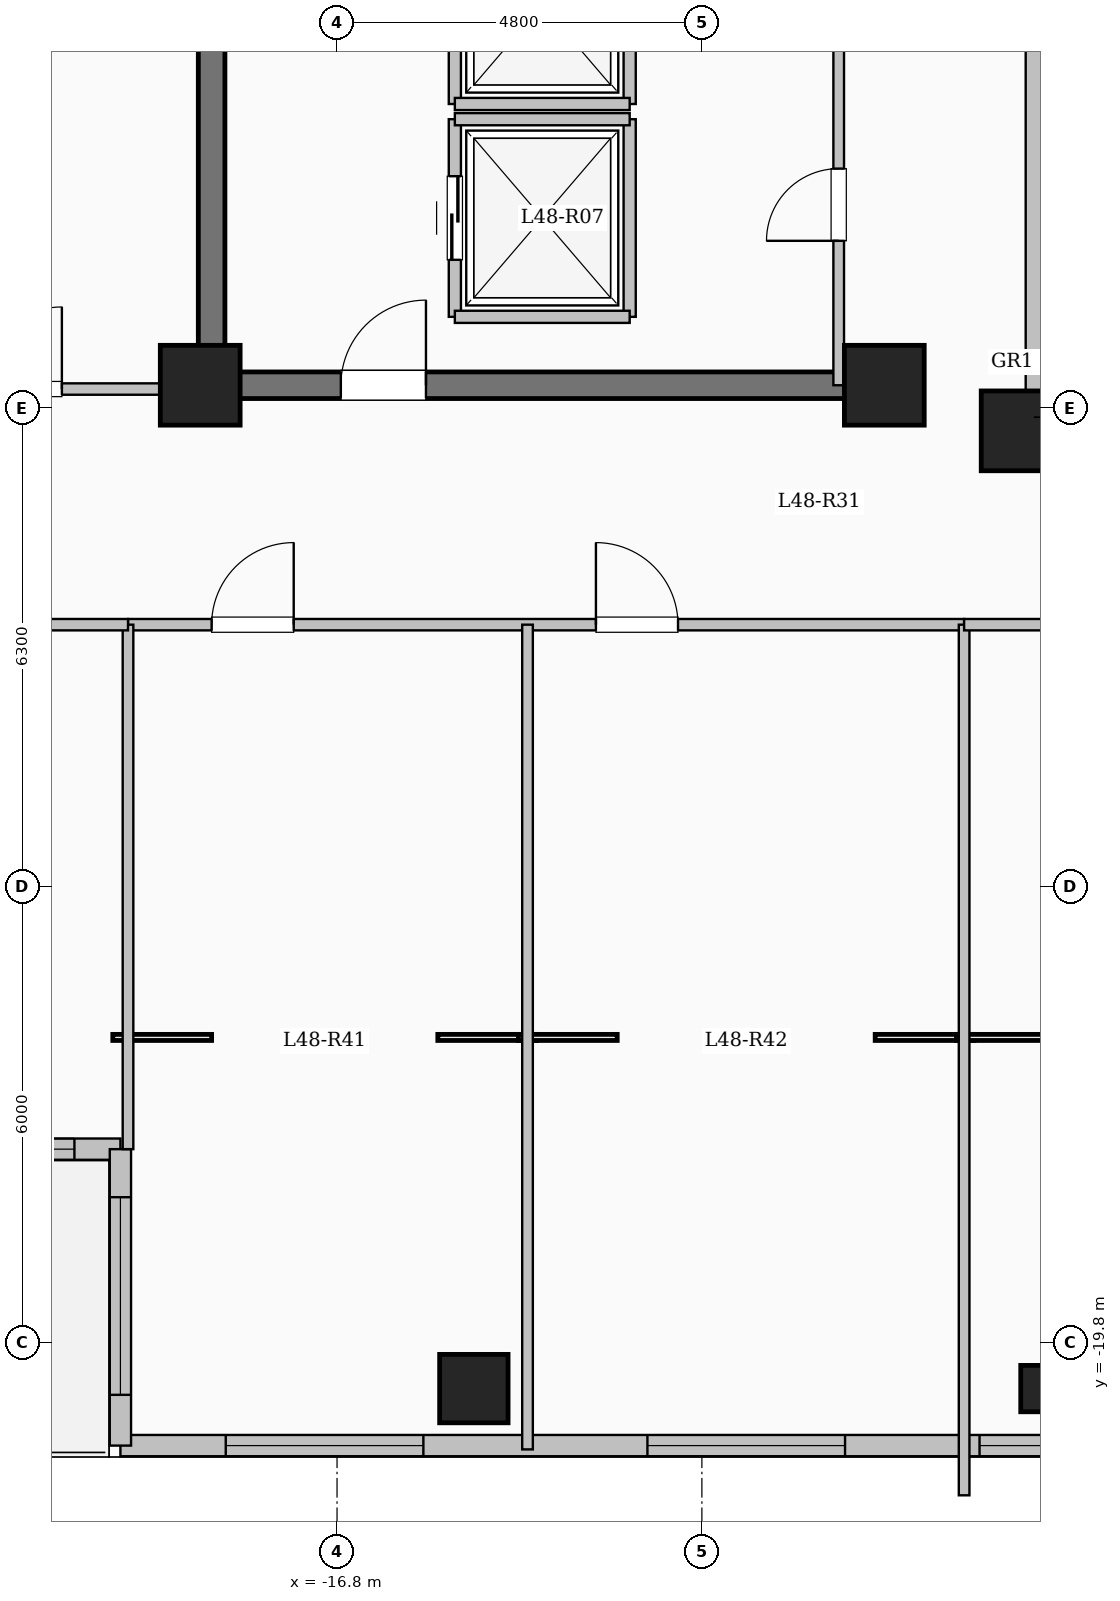
"""IFC4 building model, lengths in metres.
Left out: names, types, materials, properties, quantities, classifications, styles, units other than length and angle.
Written with IfcOpenShell. Run it as: python <this file> out.ifc"""

import sys

from ifc_helpers import new_model, si_unit, direction, frame, frame_2d, origin, origin_2d, place, context, subcontext, project, spatial, rectangle, hollow_circle, extrude, element, fill, save


model = new_model("IFC4")
c1 = context("Model", 3, precision=1e-05, world=origin(), true_north=direction((0.0, 1.0)))
c2 = subcontext(c1, "Body", "Model", "MODEL_VIEW")
j1 = project(units=[si_unit("LENGTHUNIT", "METRE"), si_unit("PLANEANGLEUNIT", "RADIAN")], contexts=[c1])
p1 = place(None, origin())
s1 = spatial("IfcSite", under=j1, at=p1, CompositionType="ELEMENT")
p2 = place(p1, origin())
s2 = spatial("IfcBuilding", under=s1, at=p2, CompositionType="ELEMENT")
p3 = place(p2, frame((0.0, 0.0, 177.3)))
s3 = spatial("IfcBuildingStorey", under=s2, at=p3, CompositionType="ELEMENT", Elevation=177.3)
for number, where, z_axis, x_axis in (
    (1, (-7.8, -7.8, 0.0), (0.0, 0.0, 1.0), (1.0, 0.0, 0.0)),
    (2, (-9.6, -7.2, 0.0), (0.0, 0.0, 1.0), (1.0, 0.0, 0.0)),
    (3, (-18.6, -7.2, 0.0), (0.0, 0.0, 1.0), (1.0, 0.0, 0.0)),
):
    element("IfcColumn", number, at=place(p3, frame(where, z_axis=z_axis, x_axis=x_axis)), inside=s3, PredefinedType="COLUMN", context=c2, shape_type="SweptSolid", body=[
        extrude(rectangle(XDim=1.05, YDim=1.05, at=origin_2d()), origin(), (0.0, 0.0, 1.0), 4.5),
    ])
p4 = place(p3, frame((-15.0, -20.4, 0.0), z_axis=(0.0, 0.0, 1.0), x_axis=(1.0, 0.0, 0.0)))
e4 = element("IfcColumn", 4, at=p4, inside=s3, PredefinedType="COLUMN", context=c2, shape_type="SweptSolid", body=[
    extrude(rectangle(XDim=0.9, YDim=0.9, at=origin_2d()), origin(), (0.0, 0.0, 1.0), 4.5),
])
p5 = place(p3, frame((-7.5, -20.4, 0.0), z_axis=(0.0, 0.0, 1.0), x_axis=(1.0, 0.0, 0.0)))
e5 = element("IfcColumn", 5, at=p5, inside=s3, PredefinedType="COLUMN", context=c2, shape_type="SweptSolid", body=[
    extrude(hollow_circle(Radius=0.305, WallThickness=0.025, at=origin_2d()), origin(), (0.0, 0.0, 1.0), 4.5),
])
p6 = place(p3, frame((-7.62, 7.62, 0.0), z_axis=(0.0, 0.0, 1.0), x_axis=(0.0, -1.0, 0.0)))
e6 = element("IfcWall", 6, at=p6, inside=s3, PredefinedType="SOLIDWALL", context=c2, shape_type="SweptSolid", body=[
    extrude(rectangle(XDim=15.24, YDim=0.24, at=frame_2d((7.62, 0.0))), origin(), (0.0, 0.0, 1.0), 4.2),
])
p7 = place(p6, frame((6.92, 0.0, 0.95)))
e7 = element("IfcOpeningElement", 7, at=p7, cuts=e6, PredefinedType="OPENING", context=c2, shape_type="SweptSolid", body=[
    extrude(rectangle(XDim=1.4, YDim=1.5, at=frame_2d((0.7, 0.75))), frame((0.0, 0.13, 0.0), z_axis=(0.0, -1.0, 0.0), x_axis=(1.0, 0.0, 0.0)), (0.0, 0.0, 1.0), 0.26),
])
p8 = place(p3, frame((-19.65, -17.25, 0.0), z_axis=(0.0, 0.0, 1.0), x_axis=(-1.0, 0.0, 0.0)))
e8 = element("IfcWall", 8, at=p8, inside=s3, PredefinedType="SOLIDWALL", context=c2, shape_type="SweptSolid", body=[
    extrude(rectangle(XDim=5.4, YDim=0.28, at=frame_2d((2.7, 0.0))), origin(), (0.0, 0.0, 1.0), 4.2),
])
p9 = place(p8, frame((2.25, 0.0, 0.0)))
e9 = element("IfcOpeningElement", 9, at=p9, cuts=e8, PredefinedType="OPENING", context=c2, shape_type="SweptSolid", body=[
    extrude(rectangle(XDim=1.1, YDim=2.2, at=frame_2d((0.55, 1.1))), frame((0.0, 0.15, 0.0), z_axis=(0.0, -1.0, 0.0), x_axis=(1.0, 0.0, 0.0)), (0.0, 0.0, 1.0), 0.3),
])
p10 = place(p8, frame((0.605, 0.0, 0.95)))
e10 = element("IfcOpeningElement", 10, at=p10, cuts=e8, PredefinedType="OPENING", context=c2, shape_type="SweptSolid", body=[
    extrude(rectangle(XDim=1.2, YDim=1.5, at=frame_2d((0.6, 0.75))), frame((0.0, 0.15, 0.0), z_axis=(0.0, -1.0, 0.0), x_axis=(1.0, 0.0, 0.0)), (0.0, 0.0, 1.0), 0.3),
])
p11 = place(p3, frame((-7.35, -21.15, 0.0), z_axis=(0.0, 0.0, 1.0), x_axis=(-1.0, 0.0, 0.0)))
e11 = element("IfcWall", 11, at=p11, inside=s3, PredefinedType="SOLIDWALL", context=c2, shape_type="SweptSolid", body=[
    extrude(rectangle(XDim=12.3, YDim=0.28, at=frame_2d((6.15, 0.0))), origin(), (0.0, 0.0, 1.0), 4.2),
])
p12 = place(p11, frame((0.147, 0.0, 0.95)))
e12 = element("IfcOpeningElement", 12, at=p12, cuts=e11, PredefinedType="OPENING", context=c2, shape_type="SweptSolid", body=[
    extrude(rectangle(XDim=0.85, YDim=1.5, at=frame_2d((0.425, 0.75))), frame((0.0, 0.15, 0.0), z_axis=(0.0, -1.0, 0.0), x_axis=(1.0, 0.0, 0.0)), (0.0, 0.0, 1.0), 0.3),
])
p13 = place(p11, frame((2.767, 0.0, 0.85)))
e13 = element("IfcOpeningElement", 13, at=p13, cuts=e11, PredefinedType="OPENING", context=c2, shape_type="SweptSolid", body=[
    extrude(rectangle(XDim=2.6, YDim=2.4, at=frame_2d((1.3, 1.2))), frame((0.0, 0.15, 0.0), z_axis=(0.0, -1.0, 0.0), x_axis=(1.0, 0.0, 0.0)), (0.0, 0.0, 1.0), 0.3),
])
p14 = place(p11, frame((8.314, 0.0, 0.85)))
e14 = element("IfcOpeningElement", 14, at=p14, cuts=e11, PredefinedType="OPENING", context=c2, shape_type="SweptSolid", body=[
    extrude(rectangle(XDim=2.6, YDim=2.4, at=frame_2d((1.3, 1.2))), frame((0.0, 0.15, 0.0), z_axis=(0.0, -1.0, 0.0), x_axis=(1.0, 0.0, 0.0)), (0.0, 0.0, 1.0), 0.3),
])
p15 = place(p3, frame((-19.65, -21.15, 0.0), z_axis=(0.0, 0.0, 1.0), x_axis=(0.0, 1.0, 0.0)))
e15 = element("IfcWall", 15, at=p15, inside=s3, PredefinedType="SOLIDWALL", context=c2, shape_type="SweptSolid", body=[
    extrude(rectangle(XDim=3.9, YDim=0.28, at=frame_2d((1.95, 0.0))), origin(), (0.0, 0.0, 1.0), 4.2),
])
p16 = place(p15, frame((0.668, 0.0, 0.85)))
e16 = element("IfcOpeningElement", 16, at=p16, cuts=e15, PredefinedType="OPENING", context=c2, shape_type="SweptSolid", body=[
    extrude(rectangle(XDim=2.6, YDim=2.4, at=frame_2d((1.3, 1.2))), frame((0.0, 0.15, 0.0), z_axis=(0.0, -1.0, 0.0), x_axis=(1.0, 0.0, 0.0)), (0.0, 0.0, 1.0), 0.3),
])
p17 = place(p3, frame((-15.25, -6.3, 0.0), z_axis=(0.0, 0.0, 1.0), x_axis=(0.0, 1.0, 0.0)))
e17 = element("IfcWall", 17, at=p17, inside=s3, PredefinedType="SOLIDWALL", context=c2, shape_type="SweptSolid", body=[
    extrude(rectangle(XDim=2.6, YDim=0.16, at=frame_2d((1.3, 0.0))), origin(), (0.0, 0.0, 1.0), 4.2),
])
p18 = place(p17, frame((0.75, 0.0, 0.0)))
e18 = element("IfcOpeningElement", 18, at=p18, cuts=e17, PredefinedType="OPENING", context=c2, shape_type="SweptSolid", body=[
    extrude(rectangle(XDim=1.1, YDim=2.15, at=frame_2d((0.55, 1.075))), frame((0.0, 0.09, 0.0), z_axis=(0.0, -1.0, 0.0), x_axis=(1.0, 0.0, 0.0)), (0.0, 0.0, 1.0), 0.18),
])
p19 = place(p3, frame((-12.95, -6.3, 0.0), z_axis=(0.0, 0.0, 1.0), x_axis=(0.0, 1.0, 0.0)))
e19 = element("IfcWall", 19, at=p19, inside=s3, PredefinedType="SOLIDWALL", context=c2, shape_type="SweptSolid", body=[
    extrude(rectangle(XDim=2.6, YDim=0.16, at=frame_2d((1.3, 0.0))), origin(), (0.0, 0.0, 1.0), 4.2),
])
for number, where, z_axis, x_axis in (
    (20, (-15.25, -6.3, 0.0), (0.0, 0.0, 1.0), (1.0, 0.0, 0.0)),
    (21, (-15.25, -3.7, 0.0), (0.0, 0.0, 1.0), (1.0, 0.0, 0.0)),
):
    element("IfcWall", number, at=place(p3, frame(where, z_axis=z_axis, x_axis=x_axis)), inside=s3, PredefinedType="SOLIDWALL", context=c2, shape_type="SweptSolid", body=[
        extrude(rectangle(XDim=2.3, YDim=0.16, at=frame_2d((1.15, 0.0))), origin(), (0.0, 0.0, 1.0), 4.2),
    ])
p20 = place(p3, frame((-15.25, -3.5, 0.0), z_axis=(0.0, 0.0, 1.0), x_axis=(0.0, 1.0, 0.0)))
e22 = element("IfcWall", 22, at=p20, inside=s3, PredefinedType="SOLIDWALL", context=c2, shape_type="SweptSolid", body=[
    extrude(rectangle(XDim=2.6, YDim=0.16, at=frame_2d((1.3, 0.0))), origin(), (0.0, 0.0, 1.0), 4.2),
])
p21 = place(p20, frame((0.75, 0.0, 0.0)))
e23 = element("IfcOpeningElement", 23, at=p21, cuts=e22, PredefinedType="OPENING", context=c2, shape_type="SweptSolid", body=[
    extrude(rectangle(XDim=1.1, YDim=2.15, at=frame_2d((0.55, 1.075))), frame((0.0, 0.09, 0.0), z_axis=(0.0, -1.0, 0.0), x_axis=(1.0, 0.0, 0.0)), (0.0, 0.0, 1.0), 0.18),
])
p22 = place(p3, frame((-12.95, -3.5, 0.0), z_axis=(0.0, 0.0, 1.0), x_axis=(0.0, 1.0, 0.0)))
e24 = element("IfcWall", 24, at=p22, inside=s3, PredefinedType="SOLIDWALL", context=c2, shape_type="SweptSolid", body=[
    extrude(rectangle(XDim=2.6, YDim=0.16, at=frame_2d((1.3, 0.0))), origin(), (0.0, 0.0, 1.0), 4.2),
])
p23 = place(p3, frame((-15.25, -3.5, 0.0), z_axis=(0.0, 0.0, 1.0), x_axis=(1.0, 0.0, 0.0)))
e25 = element("IfcWall", 25, at=p23, inside=s3, PredefinedType="SOLIDWALL", context=c2, shape_type="SweptSolid", body=[
    extrude(rectangle(XDim=2.3, YDim=0.16, at=frame_2d((1.15, 0.0))), origin(), (0.0, 0.0, 1.0), 4.2),
])
p24 = place(p3, frame((-18.45, -7.375, 0.0), z_axis=(0.0, 0.0, 1.0), x_axis=(0.0, 1.0, 0.0)))
e26 = element("IfcWall", 26, at=p24, inside=s3, PredefinedType="SHEAR", context=c2, shape_type="SweptSolid", body=[
    extrude(rectangle(XDim=14.05, YDim=0.35, at=frame_2d((7.025, 0.0))), origin(), (0.0, 0.0, 1.0), 4.5),
])
p25 = place(p3, frame((-18.625, -7.2, 0.0), z_axis=(0.0, 0.0, 1.0), x_axis=(1.0, 0.0, 0.0)))
e27 = element("IfcWall", 27, at=p25, inside=s3, PredefinedType="SHEAR", context=c2, shape_type="SweptSolid", body=[
    extrude(rectangle(XDim=8.55, YDim=0.35, at=frame_2d((4.275, 0.0))), origin(), (0.0, 0.0, 1.0), 4.5),
])
p26 = place(p25, frame((1.875, 0.0, 0.0)))
e28 = element("IfcOpeningElement", 28, at=p26, cuts=e27, PredefinedType="OPENING", context=c2, shape_type="SweptSolid", body=[
    extrude(rectangle(XDim=1.12, YDim=2.15, at=frame_2d((0.56, 1.075))), frame((0.0, 0.185, 0.0), z_axis=(0.0, -1.0, 0.0), x_axis=(1.0, 0.0, 0.0)), (0.0, 0.0, 1.0), 0.37),
])
p27 = place(p3, frame((-10.2, -7.2, 0.0), z_axis=(0.0, 0.0, 1.0), x_axis=(0.0, 1.0, 0.0)))
e29 = element("IfcWall", 29, at=p27, inside=s3, PredefinedType="PARTITIONING", context=c2, shape_type="SweptSolid", body=[
    extrude(rectangle(XDim=9.12, YDim=0.14, at=frame_2d((4.56, 0.0))), origin(), (0.0, 0.0, 1.0), 4.2),
])
p28 = place(p27, frame((1.9, 0.0, 0.0)))
e30 = element("IfcOpeningElement", 30, at=p28, cuts=e29, PredefinedType="OPENING", context=c2, shape_type="SweptSolid", body=[
    extrude(rectangle(XDim=0.95, YDim=2.12, at=frame_2d((0.475, 1.06))), frame((0.0, 0.08, 0.0), z_axis=(0.0, -1.0, 0.0), x_axis=(1.0, 0.0, 0.0)), (0.0, 0.0, 1.0), 0.16),
])
p29 = place(p27, frame((7.9, 0.0, 0.0)))
e31 = element("IfcOpeningElement", 31, at=p29, cuts=e29, PredefinedType="OPENING", context=c2, shape_type="SweptSolid", body=[
    extrude(rectangle(XDim=0.95, YDim=2.12, at=frame_2d((0.475, 1.06))), frame((0.0, 0.08, 0.0), z_axis=(0.0, -1.0, 0.0), x_axis=(1.0, 0.0, 0.0)), (0.0, 0.0, 1.0), 0.16),
])
p30 = place(p3, frame((-19.55, -10.35, 0.0), z_axis=(0.0, 0.0, 1.0), x_axis=(1.0, 0.0, 0.0)))
e32 = element("IfcWall", 32, at=p30, inside=s3, PredefinedType="PARTITIONING", context=c2, shape_type="SweptSolid", body=[
    extrude(rectangle(XDim=11.0, YDim=0.15, at=frame_2d((5.5, 0.0))), origin(), (0.0, 0.0, 1.0), 4.2),
])
p31 = place(p30, frame((1.1, 0.0, 0.0)))
e33 = element("IfcOpeningElement", 33, at=p31, cuts=e32, PredefinedType="OPENING", context=c2, shape_type="SweptSolid", body=[
    extrude(rectangle(XDim=1.08, YDim=2.15, at=frame_2d((0.54, 1.075))), frame((0.0, 0.085, 0.0), z_axis=(0.0, -1.0, 0.0), x_axis=(1.0, 0.0, 0.0)), (0.0, 0.0, 1.0), 0.17),
])
p32 = place(p30, frame((6.156, 0.0, 0.0)))
e34 = element("IfcOpeningElement", 34, at=p32, cuts=e32, PredefinedType="OPENING", context=c2, shape_type="SweptSolid", body=[
    extrude(rectangle(XDim=1.08, YDim=2.15, at=frame_2d((0.54, 1.075))), frame((0.0, 0.085, 0.0), z_axis=(0.0, -1.0, 0.0), x_axis=(1.0, 0.0, 0.0)), (0.0, 0.0, 1.0), 0.17),
])
p33 = place(p3, frame((-14.294, -21.2, 0.0), z_axis=(0.0, 0.0, 1.0), x_axis=(0.0, 1.0, 0.0)))
e35 = element("IfcWall", 35, at=p33, inside=s3, PredefinedType="PARTITIONING", context=c2, shape_type="SweptSolid", body=[
    extrude(rectangle(XDim=10.85, YDim=0.14, at=frame_2d((5.425, 0.0))), origin(), (0.0, 0.0, 1.0), 4.2),
])
p34 = place(p3, frame((-8.55, -21.804, 0.0), z_axis=(0.0, 0.0, 1.0), x_axis=(0.0, 1.0, 0.0)))
e36 = element("IfcWall", 36, at=p34, inside=s3, PredefinedType="PARTITIONING", context=c2, shape_type="SweptSolid", body=[
    extrude(rectangle(XDim=11.454, YDim=0.14, at=frame_2d((5.727, 0.0))), origin(), (0.0, 0.0, 1.0), 4.2),
])
p35 = place(p3, frame((-8.55, -10.35, 0.0), z_axis=(0.0, 0.0, 1.0), x_axis=(1.0, 0.0, 0.0)))
e37 = element("IfcWall", 37, at=p35, inside=s3, PredefinedType="PARTITIONING", context=c2, shape_type="SweptSolid", body=[
    extrude(rectangle(XDim=17.1, YDim=0.15, at=frame_2d((8.55, 0.0))), origin(), (0.0, 0.0, 1.0), 4.2),
])
p36 = place(p35, frame((1.4, 0.0, 0.0)))
e38 = element("IfcOpeningElement", 38, at=p36, cuts=e37, PredefinedType="OPENING", context=c2, shape_type="SweptSolid", body=[
    extrude(rectangle(XDim=1.08, YDim=2.15, at=frame_2d((0.54, 1.075))), frame((0.0, 0.085, 0.0), z_axis=(0.0, -1.0, 0.0), x_axis=(1.0, 0.0, 0.0)), (0.0, 0.0, 1.0), 0.17),
])
p37 = place(p35, frame((10.5, 0.0, 0.0)))
e39 = element("IfcOpeningElement", 39, at=p37, cuts=e37, PredefinedType="OPENING", context=c2, shape_type="SweptSolid", body=[
    extrude(rectangle(XDim=1.08, YDim=2.15, at=frame_2d((0.54, 1.075))), frame((0.0, 0.085, 0.0), z_axis=(0.0, -1.0, 0.0), x_axis=(1.0, 0.0, 0.0)), (0.0, 0.0, 1.0), 0.17),
])
p38 = place(p3, frame((-25.08, -7.25, 0.0), z_axis=(0.0, 0.0, 1.0), x_axis=(1.0, 0.0, 0.0)))
e40 = element("IfcWall", 40, at=p38, inside=s3, PredefinedType="PARTITIONING", context=c2, shape_type="SweptSolid", body=[
    extrude(rectangle(XDim=6.63, YDim=0.15, at=frame_2d((3.315, 0.0))), origin(), (0.0, 0.0, 1.0), 4.2),
])
p39 = place(p38, frame((3.58, 0.0, 0.0)))
e41 = element("IfcOpeningElement", 41, at=p39, cuts=e40, PredefinedType="OPENING", context=c2, shape_type="SweptSolid", body=[
    extrude(rectangle(XDim=1.08, YDim=2.15, at=frame_2d((0.54, 1.075))), frame((0.0, 0.085, 0.0), z_axis=(0.0, -1.0, 0.0), x_axis=(1.0, 0.0, 0.0)), (0.0, 0.0, 1.0), 0.17),
])
p40 = place(p3, frame((-19.55, -17.25, 0.0), z_axis=(0.0, 0.0, 1.0), x_axis=(0.0, 1.0, 0.0)))
e42 = element("IfcWall", 42, at=p40, inside=s3, PredefinedType="PARTITIONING", context=c2, shape_type="SweptSolid", body=[
    extrude(rectangle(XDim=6.9, YDim=0.14, at=frame_2d((3.45, 0.0))), origin(), (0.0, 0.0, 1.0), 4.2),
])
p41 = place(p3, frame((-25.08, -10.35, 0.0), z_axis=(0.0, 0.0, 1.0), x_axis=(1.0, 0.0, 0.0)))
e43 = element("IfcWall", 43, at=p41, inside=s3, PredefinedType="PARTITIONING", context=c2, shape_type="SweptSolid", body=[
    extrude(rectangle(XDim=5.53, YDim=0.15, at=frame_2d((2.765, 0.0))), origin(), (0.0, 0.0, 1.0), 4.2),
])
p42 = place(p41, frame((2.29, 0.0, 0.0)))
e44 = element("IfcOpeningElement", 44, at=p42, cuts=e43, PredefinedType="OPENING", context=c2, shape_type="SweptSolid", body=[
    extrude(rectangle(XDim=0.95, YDim=2.15, at=frame_2d((0.475, 1.075))), frame((0.0, 0.085, 0.0), z_axis=(0.0, -1.0, 0.0), x_axis=(1.0, 0.0, 0.0)), (0.0, 0.0, 1.0), 0.17),
])
p43 = place(p10, origin())
e45 = element("IfcWindow", 45, at=p43, inside=s3, PartitioningType="SINGLE_PANEL", PredefinedType="WINDOW", context=c2, shape_type="SweptSolid", body=[
    extrude(rectangle(XDim=1.2, YDim=1.5, at=frame_2d((0.6, 0.75))), frame((0.0, 0.03, 0.0), z_axis=(0.0, -1.0, 0.0), x_axis=(1.0, 0.0, 0.0)), (0.0, 0.0, 1.0), 0.06),
])
fill(e10, e45)
p44 = place(p12, origin())
e46 = element("IfcWindow", 46, at=p44, inside=s3, PartitioningType="SINGLE_PANEL", PredefinedType="WINDOW", context=c2, shape_type="SweptSolid", body=[
    extrude(rectangle(XDim=0.85, YDim=1.5, at=frame_2d((0.425, 0.75))), frame((0.0, 0.03, 0.0), z_axis=(0.0, -1.0, 0.0), x_axis=(1.0, 0.0, 0.0)), (0.0, 0.0, 1.0), 0.06),
])
fill(e12, e46)
p45 = place(p13, origin())
e47 = element("IfcWindow", 47, at=p45, inside=s3, PartitioningType="SINGLE_PANEL", PredefinedType="WINDOW", context=c2, shape_type="SweptSolid", body=[
    extrude(rectangle(XDim=2.6, YDim=2.4, at=frame_2d((1.3, 1.2))), frame((0.0, 0.03, 0.0), z_axis=(0.0, -1.0, 0.0), x_axis=(1.0, 0.0, 0.0)), (0.0, 0.0, 1.0), 0.06),
])
fill(e13, e47)
p46 = place(p14, origin())
e48 = element("IfcWindow", 48, at=p46, inside=s3, PartitioningType="SINGLE_PANEL", PredefinedType="WINDOW", context=c2, shape_type="SweptSolid", body=[
    extrude(rectangle(XDim=2.6, YDim=2.4, at=frame_2d((1.3, 1.2))), frame((0.0, 0.03, 0.0), z_axis=(0.0, -1.0, 0.0), x_axis=(1.0, 0.0, 0.0)), (0.0, 0.0, 1.0), 0.06),
])
fill(e14, e48)
p47 = place(p16, origin())
e49 = element("IfcWindow", 49, at=p47, inside=s3, PartitioningType="SINGLE_PANEL", PredefinedType="WINDOW", context=c2, shape_type="SweptSolid", body=[
    extrude(rectangle(XDim=2.6, YDim=2.4, at=frame_2d((1.3, 1.2))), frame((0.0, 0.03, 0.0), z_axis=(0.0, -1.0, 0.0), x_axis=(1.0, 0.0, 0.0)), (0.0, 0.0, 1.0), 0.06),
])
fill(e16, e49)
p48 = place(p18, origin())
e50 = element("IfcDoor", 50, at=p48, inside=s3, OperationType="SLIDING_TO_LEFT", PredefinedType="DOOR", context=c2, shape_type="SweptSolid", body=[
    extrude(rectangle(XDim=1.1, YDim=2.15, at=frame_2d((0.55, 1.075))), frame((0.0, 0.025, 0.0), z_axis=(0.0, -1.0, 0.0), x_axis=(1.0, 0.0, 0.0)), (0.0, 0.0, 1.0), 0.05),
])
fill(e18, e50)
p49 = place(p26, origin())
e51 = element("IfcDoor", 51, at=p49, inside=s3, OperationType="SINGLE_SWING_RIGHT", PredefinedType="DOOR", context=c2, shape_type="SweptSolid", body=[
    extrude(rectangle(XDim=1.12, YDim=2.15, at=frame_2d((0.56, 1.075))), frame((0.0, 0.025, 0.0), z_axis=(0.0, -1.0, 0.0), x_axis=(1.0, 0.0, 0.0)), (0.0, 0.0, 1.0), 0.05),
])
fill(e28, e51)
p50 = place(p28, origin())
e52 = element("IfcDoor", 52, at=p50, inside=s3, OperationType="SINGLE_SWING_LEFT", PredefinedType="DOOR", context=c2, shape_type="SweptSolid", body=[
    extrude(rectangle(XDim=0.95, YDim=2.12, at=frame_2d((0.475, 1.06))), frame((0.0, 0.025, 0.0), z_axis=(0.0, -1.0, 0.0), x_axis=(1.0, 0.0, 0.0)), (0.0, 0.0, 1.0), 0.05),
])
fill(e30, e52)
p51 = place(p31, origin())
e53 = element("IfcDoor", 53, at=p51, inside=s3, OperationType="SINGLE_SWING_RIGHT", PredefinedType="DOOR", context=c2, shape_type="SweptSolid", body=[
    extrude(rectangle(XDim=1.08, YDim=2.15, at=frame_2d((0.54, 1.075))), frame((0.0, 0.025, 0.0), z_axis=(0.0, -1.0, 0.0), x_axis=(1.0, 0.0, 0.0)), (0.0, 0.0, 1.0), 0.05),
])
fill(e33, e53)
p52 = place(p32, origin())
e54 = element("IfcDoor", 54, at=p52, inside=s3, OperationType="SINGLE_SWING_LEFT", PredefinedType="DOOR", context=c2, shape_type="SweptSolid", body=[
    extrude(rectangle(XDim=1.08, YDim=2.15, at=frame_2d((0.54, 1.075))), frame((0.0, 0.025, 0.0), z_axis=(0.0, -1.0, 0.0), x_axis=(1.0, 0.0, 0.0)), (0.0, 0.0, 1.0), 0.05),
])
fill(e34, e54)
p53 = place(p39, origin())
e55 = element("IfcDoor", 55, at=p53, inside=s3, OperationType="SINGLE_SWING_RIGHT", PredefinedType="DOOR", context=c2, shape_type="SweptSolid", body=[
    extrude(rectangle(XDim=1.08, YDim=2.15, at=frame_2d((0.54, 1.075))), frame((0.0, 0.025, 0.0), z_axis=(0.0, -1.0, 0.0), x_axis=(1.0, 0.0, 0.0)), (0.0, 0.0, 1.0), 0.05),
])
fill(e41, e55)
save(model, sys.argv[1])
